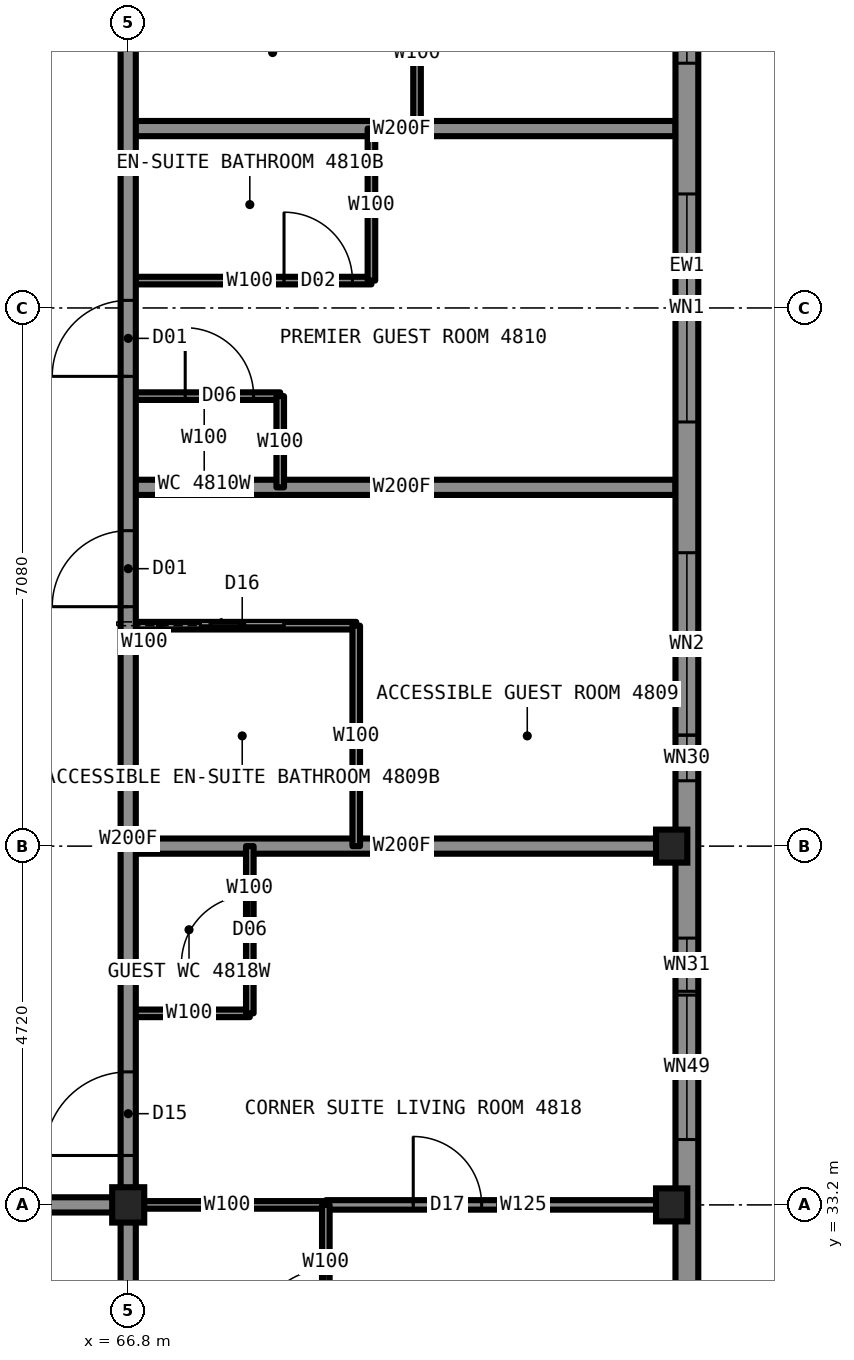
"""IFC4 building model, lengths in metres.
Left out: names, types, materials, properties, quantities, classifications, styles, units other than length and angle.
Written with IfcOpenShell. Run it as: python <this file> out.ifc"""

import sys

from ifc_helpers import new_model, si_unit, direction, frame, frame_2d, origin, origin_2d, place, context, subcontext, project, spatial, rectangle, i_section, extrude, element, fill, save


model = new_model("IFC4")
c1 = context("Model", 3, precision=1e-05, world=origin(), true_north=direction((0.0, 1.0)))
c2 = subcontext(c1, "Body", "Model", "MODEL_VIEW")
j1 = project(units=[si_unit("LENGTHUNIT", "METRE"), si_unit("PLANEANGLEUNIT", "RADIAN")], contexts=[c1])
p1 = place(None, origin())
s1 = spatial("IfcSite", under=j1, at=p1, CompositionType="ELEMENT")
p2 = place(p1, origin())
s2 = spatial("IfcBuilding", under=s1, at=p2, CompositionType="ELEMENT")
p3 = place(p2, frame((0.0, 0.0, 172.3)))
s3 = spatial("IfcBuildingStorey", under=s2, at=p3, CompositionType="ELEMENT", Elevation=172.3)
for number, where, z_axis, x_axis in (
    (1, (73.95, 33.2, 0.0), (0.0, 0.0, 1.0), (1.0, 0.0, 0.0)),
    (2, (73.95, 37.92, 0.0), (0.0, 0.0, 1.0), (1.0, 0.0, 0.0)),
):
    element("IfcColumn", number, at=place(p3, frame(where, z_axis=z_axis, x_axis=x_axis)), inside=s3, PredefinedType="COLUMN", context=c2, shape_type="SweptSolid", body=[
        extrude(i_section(OverallWidth=0.411, OverallDepth=0.434, WebThickness=0.036, FlangeThickness=0.057, at=origin_2d()), origin(), (0.0, 0.0, 1.0), 3.5),
    ])
p4 = place(p3, frame((66.8, 33.2, 0.0), z_axis=(0.0, 0.0, 1.0), x_axis=(1.0, 0.0, 0.0)))
e3 = element("IfcColumn", 3, at=p4, inside=s3, PredefinedType="COLUMN", context=c2, shape_type="SweptSolid", body=[
    extrude(i_section(OverallWidth=0.422, OverallDepth=0.465, WebThickness=0.045, FlangeThickness=0.073, at=origin_2d()), origin(), (0.0, 0.0, 1.0), 3.5),
])
p5 = place(p3, frame((66.8, 43.84, 0.0), z_axis=(0.0, 0.0, 1.0), x_axis=(1.0, 0.0, 0.0)))
e4 = element("IfcWall", 4, at=p5, inside=s3, PredefinedType="PARTITIONING", context=c2, shape_type="SweptSolid", body=[
    extrude(rectangle(XDim=2.0, YDim=0.1, at=frame_2d((1.0, 0.0))), origin(), (0.0, 0.0, 1.0), 3.33),
])
p6 = place(p5, frame((0.75, 0.0, 0.0)))
e5 = element("IfcOpeningElement", 5, at=p6, cuts=e4, PredefinedType="OPENING", context=c2, shape_type="SweptSolid", body=[
    extrude(rectangle(XDim=0.9, YDim=2.1, at=frame_2d((0.45, 1.05))), frame((0.0, 0.06, 0.0), z_axis=(0.0, -1.0, 0.0), x_axis=(1.0, 0.0, 0.0)), (0.0, 0.0, 1.0), 0.12),
])
p7 = place(p3, frame((66.8, 33.2, 0.0), z_axis=(0.0, 0.0, 1.0), x_axis=(1.0, 0.0, 0.0)))
e6 = element("IfcWall", 6, at=p7, inside=s3, PredefinedType="PARTITIONING", context=c2, shape_type="SweptSolid", body=[
    extrude(rectangle(XDim=2.6, YDim=0.1, at=frame_2d((1.3, 0.0))), origin(), (0.0, 0.0, 1.0), 2.573),
])
p8 = place(p3, frame((43.2, 33.2, 0.0), z_axis=(0.0, 0.0, 1.0), x_axis=(1.0, 0.0, 0.0)))
e7 = element("IfcWall", 7, at=p8, inside=s3, PredefinedType="PARTITIONING", context=c2, shape_type="SweptSolid", body=[
    extrude(rectangle(XDim=23.6, YDim=0.2, at=frame_2d((11.8, 0.0))), origin(), (0.0, 0.0, 1.0), 3.33),
])
p9 = place(p8, frame((1.46, 0.0, 0.0)))
e8 = element("IfcOpeningElement", 8, at=p9, cuts=e7, PredefinedType="OPENING", context=c2, shape_type="SweptSolid", body=[
    extrude(rectangle(XDim=1.0, YDim=2.2, at=frame_2d((0.5, 1.1))), frame((0.0, 0.11, 0.0), z_axis=(0.0, -1.0, 0.0), x_axis=(1.0, 0.0, 0.0)), (0.0, 0.0, 1.0), 0.22),
])
p10 = place(p8, frame((7.72, 0.0, 0.0)))
e9 = element("IfcOpeningElement", 9, at=p10, cuts=e7, PredefinedType="OPENING", context=c2, shape_type="SweptSolid", body=[
    extrude(rectangle(XDim=1.0, YDim=2.2, at=frame_2d((0.5, 1.1))), frame((0.0, 0.11, 0.0), z_axis=(0.0, -1.0, 0.0), x_axis=(1.0, 0.0, 0.0)), (0.0, 0.0, 1.0), 0.22),
])
p11 = place(p8, frame((17.16, 0.0, 0.0)))
e10 = element("IfcOpeningElement", 10, at=p11, cuts=e7, PredefinedType="OPENING", context=c2, shape_type="SweptSolid", body=[
    extrude(rectangle(XDim=1.0, YDim=2.2, at=frame_2d((0.5, 1.1))), frame((0.0, 0.11, 0.0), z_axis=(0.0, -1.0, 0.0), x_axis=(1.0, 0.0, 0.0)), (0.0, 0.0, 1.0), 0.22),
])
p12 = place(p3, frame((69.4, 33.2, 0.0), z_axis=(0.0, 0.0, 1.0), x_axis=(1.0, 0.0, 0.0)))
e11 = element("IfcWall", 11, at=p12, inside=s3, PredefinedType="PARTITIONING", context=c2, shape_type="SweptSolid", body=[
    extrude(rectangle(XDim=4.6, YDim=0.125, at=frame_2d((2.3, 0.0))), origin(), (0.0, 0.0, 1.0), 2.573),
])
p13 = place(p12, frame((1.15, 0.0, 0.0)))
e12 = element("IfcOpeningElement", 12, at=p13, cuts=e11, PredefinedType="OPENING", context=c2, shape_type="SweptSolid", body=[
    extrude(rectangle(XDim=0.9, YDim=2.2, at=frame_2d((0.45, 1.1))), frame((0.0, 0.073, 0.0), z_axis=(0.0, -1.0, 0.0), x_axis=(1.0, 0.0, 0.0)), (0.0, 0.0, 1.0), 0.145),
])
p14 = place(p3, frame((66.8, 42.64, 0.0), z_axis=(0.0, 0.0, 1.0), x_axis=(1.0, 0.0, 0.0)))
e13 = element("IfcWall", 13, at=p14, inside=s3, PredefinedType="PARTITIONING", context=c2, shape_type="SweptSolid", body=[
    extrude(rectangle(XDim=7.2, YDim=0.2, at=frame_2d((3.6, 0.0))), origin(), (0.0, 0.0, 1.0), 2.73),
])
p15 = place(p3, frame((66.8, 40.82, 0.0), z_axis=(0.0, 0.0, 1.0), x_axis=(1.0, 0.0, 0.0)))
e14 = element("IfcWall", 14, at=p15, inside=s3, PredefinedType="PARTITIONING", context=c2, shape_type="SweptSolid", body=[
    extrude(rectangle(XDim=3.0, YDim=0.1, at=frame_2d((1.5, 0.0))), origin(), (0.0, 0.0, 1.0), 3.33),
])
p16 = place(p15, frame((0.95, 0.0, 0.0)))
e15 = element("IfcOpeningElement", 15, at=p16, cuts=e14, PredefinedType="OPENING", context=c2, shape_type="SweptSolid", body=[
    extrude(rectangle(XDim=1.1, YDim=2.1, at=frame_2d((0.55, 1.05))), frame((0.0, 0.06, 0.0), z_axis=(0.0, -1.0, 0.0), x_axis=(1.0, 0.0, 0.0)), (0.0, 0.0, 1.0), 0.12),
])
p17 = place(p3, frame((66.8, 37.92, 0.0), z_axis=(0.0, 0.0, 1.0), x_axis=(1.0, 0.0, 0.0)))
e16 = element("IfcWall", 16, at=p17, inside=s3, PredefinedType="PARTITIONING", context=c2, shape_type="SweptSolid", body=[
    extrude(rectangle(XDim=7.2, YDim=0.2, at=frame_2d((3.6, 0.0))), origin(), (0.0, 0.0, 1.0), 2.573),
])
p18 = place(p3, frame((66.8, 35.72, 0.0), z_axis=(0.0, 0.0, 1.0), x_axis=(1.0, 0.0, 0.0)))
e17 = element("IfcWall", 17, at=p18, inside=s3, PredefinedType="PARTITIONING", context=c2, shape_type="SweptSolid", body=[
    extrude(rectangle(XDim=1.6, YDim=0.1, at=frame_2d((0.8, 0.0))), origin(), (0.0, 0.0, 1.0), 3.33),
])
p19 = place(p3, frame((66.8, 45.36, 0.0), z_axis=(0.0, 0.0, 1.0), x_axis=(1.0, 0.0, 0.0)))
e18 = element("IfcWall", 18, at=p19, inside=s3, PredefinedType="PARTITIONING", context=c2, shape_type="SweptSolid", body=[
    extrude(rectangle(XDim=3.2, YDim=0.1, at=frame_2d((1.6, 0.0))), origin(), (0.0, 0.0, 1.0), 3.33),
])
p20 = place(p19, frame((2.05, 0.0, 0.0)))
e19 = element("IfcOpeningElement", 19, at=p20, cuts=e18, PredefinedType="OPENING", context=c2, shape_type="SweptSolid", body=[
    extrude(rectangle(XDim=0.9, YDim=2.1, at=frame_2d((0.45, 1.05))), frame((0.0, 0.06, 0.0), z_axis=(0.0, -1.0, 0.0), x_axis=(1.0, 0.0, 0.0)), (0.0, 0.0, 1.0), 0.12),
])
p21 = place(p3, frame((66.8, 47.36, 0.0), z_axis=(0.0, 0.0, 1.0), x_axis=(1.0, 0.0, 0.0)))
e20 = element("IfcWall", 20, at=p21, inside=s3, PredefinedType="PARTITIONING", context=c2, shape_type="SweptSolid", body=[
    extrude(rectangle(XDim=7.2, YDim=0.2, at=frame_2d((3.6, 0.0))), origin(), (0.0, 0.0, 1.0), 2.73),
])
p22 = place(p3, frame((66.8, 33.2, 0.0), z_axis=(0.0, 0.0, 1.0), x_axis=(0.0, 1.0, 0.0)))
e21 = element("IfcWall", 21, at=p22, inside=s3, PredefinedType="PARTITIONING", context=c2, shape_type="SweptSolid", body=[
    extrude(rectangle(XDim=23.58, YDim=0.2, at=frame_2d((11.79, 0.0))), origin(), (0.0, 0.0, 1.0), 3.33),
])
p23 = place(p22, frame((7.87, 0.0, 0.0)))
e22 = element("IfcOpeningElement", 22, at=p23, cuts=e21, PredefinedType="OPENING", context=c2, shape_type="SweptSolid", body=[
    extrude(rectangle(XDim=1.0, YDim=2.2, at=frame_2d((0.5, 1.1))), frame((0.0, 0.11, 0.0), z_axis=(0.0, -1.0, 0.0), x_axis=(1.0, 0.0, 0.0)), (0.0, 0.0, 1.0), 0.22),
])
p24 = place(p22, frame((10.9, 0.0, 0.0)))
e23 = element("IfcOpeningElement", 23, at=p24, cuts=e21, PredefinedType="OPENING", context=c2, shape_type="SweptSolid", body=[
    extrude(rectangle(XDim=1.0, YDim=2.2, at=frame_2d((0.5, 1.1))), frame((0.0, 0.11, 0.0), z_axis=(0.0, -1.0, 0.0), x_axis=(1.0, 0.0, 0.0)), (0.0, 0.0, 1.0), 0.22),
])
p25 = place(p22, frame((16.42, 0.0, 0.0)))
e24 = element("IfcOpeningElement", 24, at=p25, cuts=e21, PredefinedType="OPENING", context=c2, shape_type="SweptSolid", body=[
    extrude(rectangle(XDim=1.0, YDim=2.2, at=frame_2d((0.5, 1.1))), frame((0.0, 0.11, 0.0), z_axis=(0.0, -1.0, 0.0), x_axis=(1.0, 0.0, 0.0)), (0.0, 0.0, 1.0), 0.22),
])
p26 = place(p22, frame((22.05, 0.0, 0.0)))
e25 = element("IfcOpeningElement", 25, at=p26, cuts=e21, PredefinedType="OPENING", context=c2, shape_type="SweptSolid", body=[
    extrude(rectangle(XDim=1.1, YDim=2.2, at=frame_2d((0.55, 1.1))), frame((0.0, 0.11, 0.0), z_axis=(0.0, -1.0, 0.0), x_axis=(1.0, 0.0, 0.0)), (0.0, 0.0, 1.0), 0.22),
])
p27 = place(p22, frame((0.65, 0.0, 0.0)))
e26 = element("IfcOpeningElement", 26, at=p27, cuts=e21, PredefinedType="OPENING", context=c2, shape_type="SweptSolid", body=[
    extrude(rectangle(XDim=1.1, YDim=2.2, at=frame_2d((0.55, 1.1))), frame((0.0, 0.11, 0.0), z_axis=(0.0, -1.0, 0.0), x_axis=(1.0, 0.0, 0.0)), (0.0, 0.0, 1.0), 0.22),
])
p28 = place(p3, frame((66.8, 26.0, 0.0), z_axis=(0.0, 0.0, 1.0), x_axis=(0.0, 1.0, 0.0)))
e27 = element("IfcWall", 27, at=p28, inside=s3, PredefinedType="PARTITIONING", context=c2, shape_type="SweptSolid", body=[
    extrude(rectangle(XDim=7.2, YDim=0.2, at=frame_2d((3.6, 0.0))), origin(), (0.0, 0.0, 1.0), 2.573),
])
p29 = place(p3, frame((68.4, 35.72, 0.0), z_axis=(0.0, 0.0, 1.0), x_axis=(0.0, 1.0, 0.0)))
e28 = element("IfcWall", 28, at=p29, inside=s3, PredefinedType="PARTITIONING", context=c2, shape_type="SweptSolid", body=[
    extrude(rectangle(XDim=2.2, YDim=0.1, at=frame_2d((1.1, 0.0))), origin(), (0.0, 0.0, 1.0), 3.33),
])
p30 = place(p29, frame((0.65, 0.0, 0.0)))
e29 = element("IfcOpeningElement", 29, at=p30, cuts=e28, PredefinedType="OPENING", context=c2, shape_type="SweptSolid", body=[
    extrude(rectangle(XDim=0.9, YDim=2.1, at=frame_2d((0.45, 1.05))), frame((0.0, 0.06, 0.0), z_axis=(0.0, -1.0, 0.0), x_axis=(1.0, 0.0, 0.0)), (0.0, 0.0, 1.0), 0.12),
])
p31 = place(p3, frame((68.8, 42.64, 0.0), z_axis=(0.0, 0.0, 1.0), x_axis=(0.0, 1.0, 0.0)))
e30 = element("IfcWall", 30, at=p31, inside=s3, PredefinedType="PARTITIONING", context=c2, shape_type="SweptSolid", body=[
    extrude(rectangle(XDim=1.2, YDim=0.1, at=frame_2d((0.6, 0.0))), origin(), (0.0, 0.0, 1.0), 3.33),
])
p32 = place(p3, frame((69.4, 30.6, 0.0), z_axis=(0.0, 0.0, 1.0), x_axis=(0.0, 1.0, 0.0)))
e31 = element("IfcWall", 31, at=p32, inside=s3, PredefinedType="PARTITIONING", context=c2, shape_type="SweptSolid", body=[
    extrude(rectangle(XDim=2.6, YDim=0.1, at=frame_2d((1.3, 0.0))), origin(), (0.0, 0.0, 1.0), 3.33),
])
p33 = place(p32, frame((0.85, 0.0, 0.0)))
e32 = element("IfcOpeningElement", 32, at=p33, cuts=e31, PredefinedType="OPENING", context=c2, shape_type="SweptSolid", body=[
    extrude(rectangle(XDim=0.9, YDim=2.1, at=frame_2d((0.45, 1.05))), frame((0.0, 0.06, 0.0), z_axis=(0.0, -1.0, 0.0), x_axis=(1.0, 0.0, 0.0)), (0.0, 0.0, 1.0), 0.12),
])
p34 = place(p3, frame((69.8, 37.92, 0.0), z_axis=(0.0, 0.0, 1.0), x_axis=(0.0, 1.0, 0.0)))
e33 = element("IfcWall", 33, at=p34, inside=s3, PredefinedType="PARTITIONING", context=c2, shape_type="SweptSolid", body=[
    extrude(rectangle(XDim=2.9, YDim=0.1, at=frame_2d((1.45, 0.0))), origin(), (0.0, 0.0, 1.0), 3.33),
])
for number, where, z_axis, x_axis in (
    (34, (70.0, 45.36, 0.0), (0.0, 0.0, 1.0), (0.0, 1.0, 0.0)),
    (35, (70.6, 47.36, 0.0), (0.0, 0.0, 1.0), (0.0, 1.0, 0.0)),
):
    element("IfcWall", number, at=place(p3, frame(where, z_axis=z_axis, x_axis=x_axis)), inside=s3, PredefinedType="PARTITIONING", context=c2, shape_type="SweptSolid", body=[
        extrude(rectangle(XDim=2.0, YDim=0.1, at=frame_2d((1.0, 0.0))), origin(), (0.0, 0.0, 1.0), 3.33),
    ])
p35 = place(p3, frame((74.15, 31.2, 0.0), z_axis=(0.0, 0.0, 1.0), x_axis=(0.0, 1.0, 0.0)))
e36 = element("IfcWall", 36, at=p35, inside=s3, PredefinedType="SOLIDWALL", context=c2, shape_type="SweptSolid", body=[
    extrude(rectangle(XDim=27.6, YDim=0.3, at=frame_2d((13.8, 0.0))), origin(), (0.0, 0.0, 1.0), 2.83),
])
p36 = place(p35, frame((3.46, 0.0, 0.3)))
e37 = element("IfcOpeningElement", 37, at=p36, cuts=e36, PredefinedType="OPENING", context=c2, shape_type="SweptSolid", body=[
    extrude(rectangle(XDim=2.4, YDim=2.0, at=frame_2d((1.2, 1.0))), frame((0.0, 0.16, 0.0), z_axis=(0.0, -1.0, 0.0), x_axis=(1.0, 0.0, 0.0)), (0.0, 0.0, 1.0), 0.32),
])
p37 = place(p35, frame((7.58, 0.0, 0.3)))
e38 = element("IfcOpeningElement", 38, at=p37, cuts=e36, PredefinedType="OPENING", context=c2, shape_type="SweptSolid", body=[
    extrude(rectangle(XDim=3.0, YDim=2.0, at=frame_2d((1.5, 1.0))), frame((0.0, 0.16, 0.0), z_axis=(0.0, -1.0, 0.0), x_axis=(1.0, 0.0, 0.0)), (0.0, 0.0, 1.0), 0.32),
])
p38 = place(p35, frame((12.3, 0.0, 0.3)))
e39 = element("IfcOpeningElement", 39, at=p38, cuts=e36, PredefinedType="OPENING", context=c2, shape_type="SweptSolid", body=[
    extrude(rectangle(XDim=3.0, YDim=2.0, at=frame_2d((1.5, 1.0))), frame((0.0, 0.16, 0.0), z_axis=(0.0, -1.0, 0.0), x_axis=(1.0, 0.0, 0.0)), (0.0, 0.0, 1.0), 0.32),
])
p39 = place(p35, frame((17.02, 0.0, 0.3)))
e40 = element("IfcOpeningElement", 40, at=p39, cuts=e36, PredefinedType="OPENING", context=c2, shape_type="SweptSolid", body=[
    extrude(rectangle(XDim=3.0, YDim=2.0, at=frame_2d((1.5, 1.0))), frame((0.0, 0.16, 0.0), z_axis=(0.0, -1.0, 0.0), x_axis=(1.0, 0.0, 0.0)), (0.0, 0.0, 1.0), 0.32),
])
p40 = place(p35, frame((21.74, 0.0, 0.3)))
e41 = element("IfcOpeningElement", 41, at=p40, cuts=e36, PredefinedType="OPENING", context=c2, shape_type="SweptSolid", body=[
    extrude(rectangle(XDim=2.4, YDim=2.0, at=frame_2d((1.2, 1.0))), frame((0.0, 0.16, 0.0), z_axis=(0.0, -1.0, 0.0), x_axis=(1.0, 0.0, 0.0)), (0.0, 0.0, 1.0), 0.32),
])
p41 = place(p35, frame((2.86, 0.0, 0.3)))
e42 = element("IfcOpeningElement", 42, at=p41, cuts=e36, PredefinedType="OPENING", context=c2, shape_type="SweptSolid", body=[
    extrude(rectangle(XDim=0.6, YDim=1.1, at=frame_2d((0.3, 0.55))), frame((0.0, 0.16, 0.0), z_axis=(0.0, -1.0, 0.0), x_axis=(1.0, 0.0, 0.0)), (0.0, 0.0, 1.0), 0.32),
])
p42 = place(p35, frame((24.14, 0.0, 0.3)))
e43 = element("IfcOpeningElement", 43, at=p42, cuts=e36, PredefinedType="OPENING", context=c2, shape_type="SweptSolid", body=[
    extrude(rectangle(XDim=0.6, YDim=1.1, at=frame_2d((0.3, 0.55))), frame((0.0, 0.16, 0.0), z_axis=(0.0, -1.0, 0.0), x_axis=(1.0, 0.0, 0.0)), (0.0, 0.0, 1.0), 0.32),
])
p43 = place(p23, origin())
e44 = element("IfcDoor", 44, at=p43, inside=s3, OperationType="SINGLE_SWING_LEFT", PredefinedType="DOOR", context=c2, shape_type="SweptSolid", body=[
    extrude(rectangle(XDim=1.0, YDim=2.2, at=frame_2d((0.5, 1.1))), frame((0.0, 0.025, 0.0), z_axis=(0.0, -1.0, 0.0), x_axis=(1.0, 0.0, 0.0)), (0.0, 0.0, 1.0), 0.05),
])
fill(e22, e44)
p44 = place(p16, origin())
e45 = element("IfcDoor", 45, at=p44, inside=s3, OperationType="SLIDING_TO_LEFT", PredefinedType="DOOR", context=c2, shape_type="SweptSolid", body=[
    extrude(rectangle(XDim=1.1, YDim=2.1, at=frame_2d((0.55, 1.05))), frame((0.0, 0.025, 0.0), z_axis=(0.0, -1.0, 0.0), x_axis=(1.0, 0.0, 0.0)), (0.0, 0.0, 1.0), 0.05),
])
fill(e15, e45)
p45 = place(p24, origin())
e46 = element("IfcDoor", 46, at=p45, inside=s3, OperationType="SINGLE_SWING_LEFT", PredefinedType="DOOR", context=c2, shape_type="SweptSolid", body=[
    extrude(rectangle(XDim=1.0, YDim=2.2, at=frame_2d((0.5, 1.1))), frame((0.0, 0.025, 0.0), z_axis=(0.0, -1.0, 0.0), x_axis=(1.0, 0.0, 0.0)), (0.0, 0.0, 1.0), 0.05),
])
fill(e23, e46)
p46 = place(p20, origin())
e47 = element("IfcDoor", 47, at=p46, inside=s3, OperationType="SINGLE_SWING_RIGHT", PredefinedType="DOOR", context=c2, shape_type="SweptSolid", body=[
    extrude(rectangle(XDim=0.9, YDim=2.1, at=frame_2d((0.45, 1.05))), frame((0.0, 0.025, 0.0), z_axis=(0.0, -1.0, 0.0), x_axis=(1.0, 0.0, 0.0)), (0.0, 0.0, 1.0), 0.05),
])
fill(e19, e47)
p47 = place(p6, origin())
e48 = element("IfcDoor", 48, at=p47, inside=s3, OperationType="SINGLE_SWING_LEFT", PredefinedType="DOOR", context=c2, shape_type="SweptSolid", body=[
    extrude(rectangle(XDim=0.9, YDim=2.1, at=frame_2d((0.45, 1.05))), frame((0.0, 0.025, 0.0), z_axis=(0.0, -1.0, 0.0), x_axis=(1.0, 0.0, 0.0)), (0.0, 0.0, 1.0), 0.05),
])
fill(e5, e48)
p48 = place(p27, origin())
e49 = element("IfcDoor", 49, at=p48, inside=s3, OperationType="SINGLE_SWING_LEFT", PredefinedType="DOOR", context=c2, shape_type="SweptSolid", body=[
    extrude(rectangle(XDim=1.1, YDim=2.2, at=frame_2d((0.55, 1.1))), frame((0.0, 0.025, 0.0), z_axis=(0.0, -1.0, 0.0), x_axis=(1.0, 0.0, 0.0)), (0.0, 0.0, 1.0), 0.05),
])
fill(e26, e49)
p49 = place(p33, origin())
e50 = element("IfcDoor", 50, at=p49, inside=s3, OperationType="SINGLE_SWING_RIGHT", PredefinedType="DOOR", context=c2, shape_type="SweptSolid", body=[
    extrude(rectangle(XDim=0.9, YDim=2.1, at=frame_2d((0.45, 1.05))), frame((0.0, 0.025, 0.0), z_axis=(0.0, -1.0, 0.0), x_axis=(1.0, 0.0, 0.0)), (0.0, 0.0, 1.0), 0.05),
])
fill(e32, e50)
p50 = place(p13, origin())
e51 = element("IfcDoor", 51, at=p50, inside=s3, OperationType="SINGLE_SWING_LEFT", PredefinedType="DOOR", context=c2, shape_type="SweptSolid", body=[
    extrude(rectangle(XDim=0.9, YDim=2.2, at=frame_2d((0.45, 1.1))), frame((0.0, 0.025, 0.0), z_axis=(0.0, -1.0, 0.0), x_axis=(1.0, 0.0, 0.0)), (0.0, 0.0, 1.0), 0.05),
])
fill(e12, e51)
p51 = place(p30, origin())
e52 = element("IfcDoor", 52, at=p51, inside=s3, OperationType="SINGLE_SWING_LEFT", PredefinedType="DOOR", context=c2, shape_type="SweptSolid", body=[
    extrude(rectangle(XDim=0.9, YDim=2.1, at=frame_2d((0.45, 1.05))), frame((0.0, 0.025, 0.0), z_axis=(0.0, -1.0, 0.0), x_axis=(1.0, 0.0, 0.0)), (0.0, 0.0, 1.0), 0.05),
])
fill(e29, e52)
p52 = place(p36, origin())
e53 = element("IfcWindow", 53, at=p52, inside=s3, PartitioningType="SINGLE_PANEL", PredefinedType="WINDOW", context=c2, shape_type="SweptSolid", body=[
    extrude(rectangle(XDim=2.4, YDim=2.0, at=frame_2d((1.2, 1.0))), frame((0.0, 0.13, 0.0), z_axis=(0.0, -1.0, 0.0), x_axis=(1.0, 0.0, 0.0)), (0.0, 0.0, 1.0), 0.06),
])
fill(e37, e53)
p53 = place(p37, origin())
e54 = element("IfcWindow", 54, at=p53, inside=s3, PartitioningType="SINGLE_PANEL", PredefinedType="WINDOW", context=c2, shape_type="SweptSolid", body=[
    extrude(rectangle(XDim=3.0, YDim=2.0, at=frame_2d((1.5, 1.0))), frame((0.0, 0.13, 0.0), z_axis=(0.0, -1.0, 0.0), x_axis=(1.0, 0.0, 0.0)), (0.0, 0.0, 1.0), 0.06),
])
fill(e38, e54)
p54 = place(p38, origin())
e55 = element("IfcWindow", 55, at=p54, inside=s3, PartitioningType="SINGLE_PANEL", PredefinedType="WINDOW", context=c2, shape_type="SweptSolid", body=[
    extrude(rectangle(XDim=3.0, YDim=2.0, at=frame_2d((1.5, 1.0))), frame((0.0, 0.13, 0.0), z_axis=(0.0, -1.0, 0.0), x_axis=(1.0, 0.0, 0.0)), (0.0, 0.0, 1.0), 0.06),
])
fill(e39, e55)
p55 = place(p39, origin())
e56 = element("IfcWindow", 56, at=p55, inside=s3, PartitioningType="SINGLE_PANEL", PredefinedType="WINDOW", context=c2, shape_type="SweptSolid", body=[
    extrude(rectangle(XDim=3.0, YDim=2.0, at=frame_2d((1.5, 1.0))), frame((0.0, 0.13, 0.0), z_axis=(0.0, -1.0, 0.0), x_axis=(1.0, 0.0, 0.0)), (0.0, 0.0, 1.0), 0.06),
])
fill(e40, e56)
p56 = place(p41, origin())
e57 = element("IfcWindow", 57, at=p56, inside=s3, PartitioningType="SINGLE_PANEL", PredefinedType="WINDOW", context=c2, shape_type="SweptSolid", body=[
    extrude(rectangle(XDim=0.6, YDim=1.1, at=frame_2d((0.3, 0.55))), frame((0.0, 0.13, 0.0), z_axis=(0.0, -1.0, 0.0), x_axis=(1.0, 0.0, 0.0)), (0.0, 0.0, 1.0), 0.06),
])
fill(e42, e57)
save(model, sys.argv[1])
